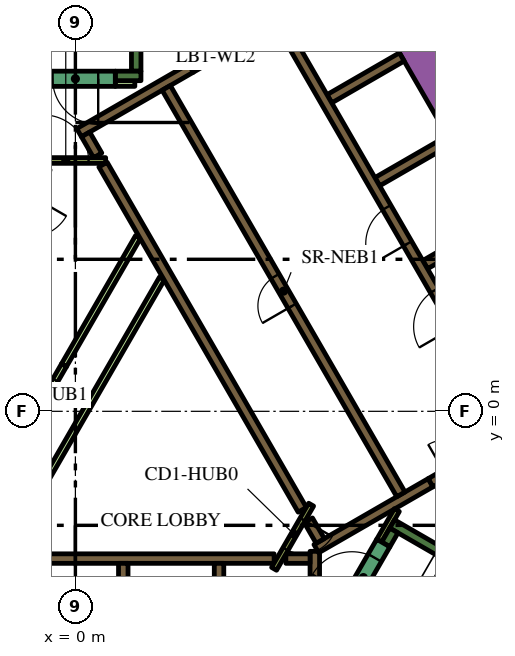
"""IFC4 building model, lengths in metres.
Left out: names, types, materials, properties, quantities, classifications, styles, units other than length and angle.
Written with IfcOpenShell. Run it as: python <this file> out.ifc"""

import sys

from ifc_helpers import new_model, si_unit, direction, frame, frame_2d, origin, place, context, subcontext, project, spatial, rectangle, extrude, element, fill, save


model = new_model("IFC4")
c1 = context("Model", 3, precision=1e-05, world=origin(), true_north=direction((0.0, 1.0)))
c2 = subcontext(c1, "Body", "Model", "MODEL_VIEW")
j1 = project(units=[si_unit("LENGTHUNIT", "METRE"), si_unit("PLANEANGLEUNIT", "RADIAN")], contexts=[c1])
p1 = place(None, origin())
s1 = spatial("IfcSite", under=j1, at=p1, CompositionType="ELEMENT")
p2 = place(p1, origin())
s2 = spatial("IfcBuilding", under=s1, at=p2, CompositionType="ELEMENT")
p3 = place(p2, frame((0.0, 0.0, 74.4)))
s3 = spatial("IfcBuildingStorey", under=s2, at=p3, CompositionType="ELEMENT", Elevation=74.4)
p4 = place(p3, frame((6.461, 13.909, 0.0), z_axis=(0.0, 0.0, 1.0), x_axis=(0.500005804227, -0.866022052686, 0.0)))
e1 = element("IfcWall", 1, at=p4, inside=s3, PredefinedType="SOLIDWALL", context=c2, shape_type="SweptSolid", body=[
    extrude(rectangle(XDim=20.834, YDim=0.9, at=frame_2d((10.417, 0.0))), origin(), (0.0, 0.0, 1.0), 3.9),
])
p5 = place(p3, frame((8.334, -2.964, 0.0), z_axis=(0.0, 0.0, 1.0), x_axis=(0.866016039709, -0.500016218704, 0.0)))
e2 = element("IfcWall", 2, at=p5, inside=s3, PredefinedType="SOLIDWALL", context=c2, shape_type="SweptSolid", body=[
    extrude(rectangle(XDim=7.05, YDim=0.25, at=frame_2d((3.525, 0.0))), origin(), (0.0, 0.0, 1.0), 3.9),
])
p6 = place(p3, frame((8.168, -3.503, 0.0), z_axis=(0.0, 0.0, 1.0), x_axis=(0.49972245349, 0.866185586049, 0.0)))
e3 = element("IfcWall", 3, at=p6, inside=s3, PredefinedType="SOLIDWALL", context=c2, shape_type="SweptSolid", body=[
    extrude(rectangle(XDim=0.425, YDim=0.25, at=frame_2d((0.212, 0.0))), origin(), (0.0, 0.0, 1.0), 3.9),
])
p7 = place(p3, frame((1.6, 8.95, 0.0), z_axis=(0.0, 0.0, 1.0), x_axis=(0.0, 1.0, 0.0)))
e4 = element("IfcWall", 4, at=p7, inside=s3, PredefinedType="SOLIDWALL", context=c2, shape_type="SweptSolid", body=[
    extrude(rectangle(XDim=6.8, YDim=0.25, at=frame_2d((3.4, 0.0))), origin(), (0.0, 0.0, 1.0), 3.9),
])
p8 = place(p3, frame((1.05, 8.825, 0.0), z_axis=(0.0, 0.0, 1.0), x_axis=(1.0, 0.0, 0.0)))
e5 = element("IfcWall", 5, at=p8, inside=s3, PredefinedType="SOLIDWALL", context=c2, shape_type="SweptSolid", body=[
    extrude(rectangle(XDim=0.675, YDim=0.25, at=frame_2d((0.337, 0.0))), origin(), (0.0, 0.0, 1.0), 3.9),
])
p9 = place(p3, frame((-5.259, -3.875, 0.0), z_axis=(0.0, 0.0, 1.0), x_axis=(1.0, 0.0, 0.0)))
e6 = element("IfcWall", 6, at=p9, inside=s3, PredefinedType="SOLIDWALL", context=c2, shape_type="SweptSolid", body=[
    extrude(rectangle(XDim=10.489, YDim=0.25, at=frame_2d((5.244, 0.0))), origin(), (0.0, 0.0, 1.0), 3.9),
])
for number, where, z_axis, x_axis in (
    (7, (3.78, -4.0, 0.0), (0.0, 0.0, 1.0), (0.0, -1.0, 0.0)),
    (8, (1.26, -4.0, 0.0), (0.0, 0.0, 1.0), (0.0, -1.0, 0.0)),
):
    element("IfcWall", number, at=place(p3, frame(where, z_axis=z_axis, x_axis=x_axis)), inside=s3, PredefinedType="SOLIDWALL", context=c2, shape_type="SweptSolid", body=[
        extrude(rectangle(XDim=2.2, YDim=0.25, at=frame_2d((1.1, 0.0))), origin(), (0.0, 0.0, 1.0), 3.9),
    ])
p10 = place(p3, frame((6.3, -7.27, 0.0), z_axis=(0.0, 0.0, 1.0), x_axis=(0.0, 1.0, 0.0)))
e9 = element("IfcWall", 9, at=p10, inside=s3, PredefinedType="SOLIDWALL", context=c2, shape_type="SweptSolid", body=[
    extrude(rectangle(XDim=3.586, YDim=0.25, at=frame_2d((1.793, 0.0))), origin(), (0.0, 0.0, 1.0), 3.9),
])
p11 = place(p3, frame((5.538, -3.875, 0.0), z_axis=(0.0, 0.0, 1.0), x_axis=(1.0, 0.0, 0.0)))
e10 = element("IfcWall", 10, at=p11, inside=s3, PredefinedType="SOLIDWALL", context=c2, shape_type="SweptSolid", body=[
    extrude(rectangle(XDim=0.637, YDim=0.25, at=frame_2d((0.318, 0.0))), origin(), (0.0, 0.0, 1.0), 3.9),
])
p12 = place(p3, frame((9.346, -1.879, 0.0), z_axis=(0.0, 0.0, 1.0), x_axis=(-0.866048528039, -0.499959945477, 0.0)))
e11 = element("IfcWall", 11, at=p12, inside=s3, PredefinedType="SOLIDWALL", context=c2, shape_type="SweptSolid", body=[
    extrude(rectangle(XDim=3.47, YDim=0.25, at=frame_2d((1.735, 0.0))), origin(), (0.0, 0.0, 1.0), 3.9),
])
p13 = place(p3, frame((6.13, -2.867, 0.0), z_axis=(0.0, 0.0, 1.0), x_axis=(0.500160776593, -0.865932559475, 0.0)))
e12 = element("IfcWall", 12, at=p13, inside=s3, PredefinedType="SOLIDWALL", context=c2, shape_type="SweptSolid", body=[
    extrude(rectangle(XDim=0.627, YDim=0.25, at=frame_2d((0.313, 0.0))), origin(), (0.0, 0.0, 1.0), 3.9),
])
for number, where, z_axis, x_axis in (
    (13, (9.204, 3.859, 0.0), (0.0, 0.0, 1.0), (0.866, 0.5, 0.0)),
    (14, (7.944, 6.041, 0.0), (0.0, 0.0, 1.0), (0.866, 0.5, 0.0)),
    (15, (6.684, 8.224, 0.0), (0.0, 0.0, 1.0), (0.866, 0.5, 0.0)),
):
    element("IfcWall", number, at=place(p3, frame(where, z_axis=z_axis, x_axis=x_axis)), inside=s3, PredefinedType="SOLIDWALL", context=c2, shape_type="SweptSolid", body=[
        extrude(rectangle(XDim=2.2, YDim=0.25, at=frame_2d((1.1, 0.0))), origin(), (0.0, 0.0, 1.0), 3.9),
    ])
p14 = place(p3, frame((0.098, 7.331, 0.0), z_axis=(0.0, 0.0, 1.0), x_axis=(0.865988154826, 0.50006451154, 0.0)))
e16 = element("IfcWall", 16, at=p14, inside=s3, PredefinedType="SOLIDWALL", context=c2, shape_type="SweptSolid", body=[
    extrude(rectangle(XDim=3.398, YDim=0.25, at=frame_2d((1.699, 0.0))), origin(), (0.0, 0.0, 1.0), 3.9),
])
p15 = place(p3, frame((0.268, 7.285, 0.0), z_axis=(0.0, 0.0, 1.0), x_axis=(0.500098681536, -0.865968422476, 0.0)))
e17 = element("IfcWall", 17, at=p15, inside=s3, PredefinedType="SOLIDWALL", context=c2, shape_type="SweptSolid", body=[
    extrude(rectangle(XDim=0.636, YDim=0.25, at=frame_2d((0.318, 0.0))), origin(), (0.0, 0.0, 1.0), 3.9),
])
p16 = place(p3, frame((5.97, -2.591, 0.0), z_axis=(0.0, 0.0, 1.0), x_axis=(-0.499994469932, 0.866028596547, 0.0)))
e18 = element("IfcWall", 18, at=p16, inside=s3, PredefinedType="SOLIDWALL", context=c2, shape_type="SweptSolid", body=[
    extrude(rectangle(XDim=10.488, YDim=0.25, at=frame_2d((5.244, 0.0))), origin(), (0.0, 0.0, 1.0), 3.9),
])
p17 = place(p3, frame((8.459, -2.599, 0.0), z_axis=(0.0, 0.0, 1.0), x_axis=(-0.500041054325, -0.866001699761, 0.0)))
e19 = element("IfcWall", 19, at=p17, inside=s3, PredefinedType="PARTITIONING", context=c2, shape_type="SweptSolid", body=[
    extrude(rectangle(XDim=0.929, YDim=0.15, at=frame_2d((0.464, 0.0))), origin(), (0.0, 0.0, 1.0), 3.9),
])
p18 = place(p3, frame((-1.887, -3.718, 0.0), z_axis=(0.0, 0.0, 1.0), x_axis=(0.500005008002, 0.866022512394, 0.0)))
e20 = element("IfcWall", 20, at=p18, inside=s3, PredefinedType="PARTITIONING", context=c2, shape_type="SweptSolid", body=[
    extrude(rectangle(XDim=8.327, YDim=0.15, at=frame_2d((4.164, 0.0))), origin(), (0.0, 0.0, 1.0), 2.7),
])
p19 = place(p3, frame((-0.3, 1.212, 0.0), z_axis=(0.0, 0.0, 1.0), x_axis=(0.499963101113, 0.866046706318, 0.0)))
e21 = element("IfcWall", 21, at=p19, inside=s3, PredefinedType="PARTITIONING", context=c2, shape_type="SweptSolid", body=[
    extrude(rectangle(XDim=3.893, YDim=0.15, at=frame_2d((1.947, 0.0))), origin(), (0.0, 0.0, 1.0), 2.7),
])
p20 = place(p3, frame((1.05, 8.625, 0.0), z_axis=(0.0, 0.0, 1.0), x_axis=(1.0, 0.0, 0.0)))
e22 = element("IfcWall", 22, at=p20, inside=s3, PredefinedType="PARTITIONING", context=c2, shape_type="SweptSolid", body=[
    extrude(rectangle(XDim=0.514, YDim=0.15, at=frame_2d((0.257, 0.0))), origin(), (0.0, 0.0, 1.0), 2.7),
])
p21 = place(p3, frame((11.553, -0.46, 0.0), z_axis=(0.0, 0.0, 1.0), x_axis=(-0.500006514828, 0.866021642414, 0.0)))
e23 = element("IfcWall", 23, at=p21, inside=s3, PredefinedType="SOLIDWALL", context=c2, shape_type="SweptSolid", body=[
    extrude(rectangle(XDim=12.35, YDim=0.25, at=frame_2d((6.175, 0.0))), origin(), (0.0, 0.0, 1.0), 3.9),
])
p22 = place(p21, frame((0.585, 0.0, 0.0)))
e24 = element("IfcOpeningElement", 24, at=p22, cuts=e23, PredefinedType="OPENING", context=c2, shape_type="SweptSolid", body=[
    extrude(rectangle(XDim=1.1, YDim=2.1, at=frame_2d((0.55, 1.05))), frame((0.0, 0.135, 0.0), z_axis=(0.0, -1.0, 0.0), x_axis=(1.0, 0.0, 0.0)), (0.0, 0.0, 1.0), 0.27),
])
p23 = place(p21, frame((3.105, 0.0, 0.0)))
e25 = element("IfcOpeningElement", 25, at=p23, cuts=e23, PredefinedType="OPENING", context=c2, shape_type="SweptSolid", body=[
    extrude(rectangle(XDim=1.1, YDim=2.1, at=frame_2d((0.55, 1.05))), frame((0.0, 0.135, 0.0), z_axis=(0.0, -1.0, 0.0), x_axis=(1.0, 0.0, 0.0)), (0.0, 0.0, 1.0), 0.27),
])
p24 = place(p21, frame((5.625, 0.0, 0.0)))
e26 = element("IfcOpeningElement", 26, at=p24, cuts=e23, PredefinedType="OPENING", context=c2, shape_type="SweptSolid", body=[
    extrude(rectangle(XDim=1.1, YDim=2.1, at=frame_2d((0.55, 1.05))), frame((0.0, 0.135, 0.0), z_axis=(0.0, -1.0, 0.0), x_axis=(1.0, 0.0, 0.0)), (0.0, 0.0, 1.0), 0.27),
])
p25 = place(p3, frame((8.565, -2.185, 0.0), z_axis=(0.0, 0.0, 1.0), x_axis=(-0.499997954832, 0.866026584559, 0.0)))
e27 = element("IfcWall", 27, at=p25, inside=s3, PredefinedType="SOLIDWALL", context=c2, shape_type="SweptSolid", body=[
    extrude(rectangle(XDim=12.35, YDim=0.25, at=frame_2d((6.175, 0.0))), origin(), (0.0, 0.0, 1.0), 3.9),
])
p26 = place(p25, frame((5.725, 0.0, 0.0)))
e28 = element("IfcOpeningElement", 28, at=p26, cuts=e27, PredefinedType="OPENING", context=c2, shape_type="SweptSolid", body=[
    extrude(rectangle(XDim=0.9, YDim=2.1, at=frame_2d((0.45, 1.05))), frame((0.0, 0.135, 0.0), z_axis=(0.0, -1.0, 0.0), x_axis=(1.0, 0.0, 0.0)), (0.0, 0.0, 1.0), 0.27),
])
p27 = place(p3, frame((7.053, -5.284, 0.0), z_axis=(0.0, 0.0, 1.0), x_axis=(0.500078061341, 0.865980330357, 0.0)))
e29 = element("IfcWall", 29, at=p27, inside=s3, PredefinedType="SOLIDWALL", context=c2, shape_type="SweptSolid", body=[
    extrude(rectangle(XDim=2.1, YDim=0.4, at=frame_2d((1.05, 0.0))), origin(), (0.0, 0.0, 1.0), 3.9),
])
p28 = place(p27, frame((0.45, 0.0, 0.0)))
e30 = element("IfcOpeningElement", 30, at=p28, cuts=e29, PredefinedType="OPENING", context=c2, shape_type="SweptSolid", body=[
    extrude(rectangle(XDim=1.2, YDim=2.1, at=frame_2d((0.6, 1.05))), frame((0.0, 0.21, 0.0), z_axis=(0.0, -1.0, 0.0), x_axis=(1.0, 0.0, 0.0)), (0.0, 0.0, 1.0), 0.42),
])
p29 = place(p3, frame((9.346, -1.879, 0.0), z_axis=(0.0, 0.0, 1.0), x_axis=(0.866047807691, 0.499961193289, 0.0)))
e31 = element("IfcWall", 31, at=p29, inside=s3, PredefinedType="SOLIDWALL", context=c2, shape_type="SweptSolid", body=[
    extrude(rectangle(XDim=1.8, YDim=0.25, at=frame_2d((0.9, 0.0))), origin(), (0.0, 0.0, 1.0), 3.9),
])
p30 = place(p29, frame((0.45, 0.0, 0.0)))
e32 = element("IfcOpeningElement", 32, at=p30, cuts=e31, PredefinedType="OPENING", context=c2, shape_type="SweptSolid", body=[
    extrude(rectangle(XDim=0.9, YDim=2.1, at=frame_2d((0.45, 1.05))), frame((0.0, 0.135, 0.0), z_axis=(0.0, -1.0, 0.0), x_axis=(1.0, 0.0, 0.0)), (0.0, 0.0, 1.0), 0.27),
])
p31 = place(p3, frame((1.05, 8.75, 0.0), z_axis=(0.0, 0.0, 1.0), x_axis=(-1.0, 0.0, 0.0)))
e33 = element("IfcWall", 33, at=p31, inside=s3, PredefinedType="SOLIDWALL", context=c2, shape_type="SweptSolid", body=[
    extrude(rectangle(XDim=2.1, YDim=0.4, at=frame_2d((1.05, 0.0))), origin(), (0.0, 0.0, 1.0), 3.9),
])
p32 = place(p31, frame((0.45, 0.0, 0.0)))
e34 = element("IfcOpeningElement", 34, at=p32, cuts=e33, PredefinedType="OPENING", context=c2, shape_type="SweptSolid", body=[
    extrude(rectangle(XDim=1.2, YDim=2.1, at=frame_2d((0.6, 1.05))), frame((0.0, 0.21, 0.0), z_axis=(0.0, -1.0, 0.0), x_axis=(1.0, 0.0, 0.0)), (0.0, 0.0, 1.0), 0.42),
])
p33 = place(p3, frame((6.203, -2.456, 0.0), z_axis=(0.0, 0.0, 1.0), x_axis=(-0.500043961785, -0.866000020948, 0.0)))
e35 = element("IfcWall", 35, at=p33, inside=s3, PredefinedType="PARTITIONING", context=c2, shape_type="SweptSolid", body=[
    extrude(rectangle(XDim=1.95, YDim=0.15, at=frame_2d((0.975, 0.0))), origin(), (0.0, 0.0, 1.0), 3.9),
])
p34 = place(p33, frame((0.45, 0.0, 0.0)))
e36 = element("IfcOpeningElement", 36, at=p34, cuts=e35, PredefinedType="OPENING", context=c2, shape_type="SweptSolid", body=[
    extrude(rectangle(XDim=0.9, YDim=2.1, at=frame_2d((0.45, 1.05))), frame((0.0, 0.085, 0.0), z_axis=(0.0, -1.0, 0.0), x_axis=(1.0, 0.0, 0.0)), (0.0, 0.0, 1.0), 0.17),
])
p35 = place(p3, frame((-1.303, 6.6, 0.0), z_axis=(0.0, 0.0, 1.0), x_axis=(1.0, 0.0, 0.0)))
e37 = element("IfcWall", 37, at=p35, inside=s3, PredefinedType="PARTITIONING", context=c2, shape_type="SweptSolid", body=[
    extrude(rectangle(XDim=2.1, YDim=0.15, at=frame_2d((1.05, 0.0))), origin(), (0.0, 0.0, 1.0), 3.9),
])
p36 = place(p35, frame((0.45, 0.0, 0.0)))
e38 = element("IfcOpeningElement", 38, at=p36, cuts=e37, PredefinedType="OPENING", context=c2, shape_type="SweptSolid", body=[
    extrude(rectangle(XDim=1.2, YDim=2.1, at=frame_2d((0.6, 1.05))), frame((0.0, 0.085, 0.0), z_axis=(0.0, -1.0, 0.0), x_axis=(1.0, 0.0, 0.0)), (0.0, 0.0, 1.0), 0.17),
])
p37 = place(p3, frame((3.081, 8.961, 0.0), z_axis=(0.0, 0.0, 1.0), x_axis=(0.866034573852, 0.49998411664, 0.0)))
e39 = element("IfcWall", 39, at=p37, inside=s3, PredefinedType="PARTITIONING", context=c2, shape_type="SweptSolid", body=[
    extrude(rectangle(XDim=1.4, YDim=0.09, at=frame_2d((0.7, 0.0))), origin(), (0.0, 0.0, 1.0), 2.7),
])
p38 = place(p37, frame((0.1, 0.0, 0.0)))
e40 = element("IfcOpeningElement", 40, at=p38, cuts=e39, PredefinedType="OPENING", context=c2, shape_type="SweptSolid", body=[
    extrude(rectangle(XDim=1.2, YDim=2.1, at=frame_2d((0.6, 1.05))), frame((0.0, 0.055, 0.0), z_axis=(0.0, -1.0, 0.0), x_axis=(1.0, 0.0, 0.0)), (0.0, 0.0, 1.0), 0.11),
])
p39 = place(p3, frame((-1.2, -0.346, 0.0), z_axis=(0.0, 0.0, 1.0), x_axis=(0.499961193289, 0.866047807691, 0.0)))
e41 = element("IfcWall", 41, at=p39, inside=s3, PredefinedType="PARTITIONING", context=c2, shape_type="SweptSolid", body=[
    extrude(rectangle(XDim=1.8, YDim=0.15, at=frame_2d((0.9, 0.0))), origin(), (0.0, 0.0, 1.0), 2.7),
])
p40 = place(p39, frame((0.45, 0.0, 0.0)))
e42 = element("IfcOpeningElement", 42, at=p40, cuts=e41, PredefinedType="OPENING", context=c2, shape_type="SweptSolid", body=[
    extrude(rectangle(XDim=0.9, YDim=2.1, at=frame_2d((0.45, 1.05))), frame((0.0, 0.085, 0.0), z_axis=(0.0, -1.0, 0.0), x_axis=(1.0, 0.0, 0.0)), (0.0, 0.0, 1.0), 0.17),
])
p41 = place(p3, frame((6.163, 18.475, 0.0), z_axis=(0.0, 0.0, 1.0), x_axis=(0.500001317485, -0.866024643133, 0.0)))
e43 = element("IfcWall", 43, at=p41, inside=s3, PredefinedType="PARTITIONING", context=c2, shape_type="SweptSolid", body=[
    extrude(rectangle(XDim=25.767, YDim=0.15, at=frame_2d((12.883, 0.0))), origin(), (0.0, 0.0, 1.0), 2.7),
])
p42 = place(p41, frame((21.953, 0.0, 0.0)))
e44 = element("IfcOpeningElement", 44, at=p42, cuts=e43, PredefinedType="OPENING", context=c2, shape_type="SweptSolid", body=[
    extrude(rectangle(XDim=1.0, YDim=2.1, at=frame_2d((0.5, 1.05))), frame((0.0, 0.085, 0.0), z_axis=(0.0, -1.0, 0.0), x_axis=(1.0, 0.0, 0.0)), (0.0, 0.0, 1.0), 0.17),
])
p43 = place(p41, frame((9.948, 0.0, 0.0)))
e45 = element("IfcOpeningElement", 45, at=p43, cuts=e43, PredefinedType="OPENING", context=c2, shape_type="SweptSolid", body=[
    extrude(rectangle(XDim=1.0, YDim=2.1, at=frame_2d((0.5, 1.05))), frame((0.0, 0.085, 0.0), z_axis=(0.0, -1.0, 0.0), x_axis=(1.0, 0.0, 0.0)), (0.0, 0.0, 1.0), 0.17),
])
p44 = place(p41, frame((8.641, 0.0, 0.0)))
e46 = element("IfcOpeningElement", 46, at=p44, cuts=e43, PredefinedType="OPENING", context=c2, shape_type="SweptSolid", body=[
    extrude(rectangle(XDim=1.0, YDim=2.1, at=frame_2d((0.5, 1.05))), frame((0.0, 0.085, 0.0), z_axis=(0.0, -1.0, 0.0), x_axis=(1.0, 0.0, 0.0)), (0.0, 0.0, 1.0), 0.17),
])
p45 = place(p23, origin())
e47 = element("IfcDoor", 47, at=p45, inside=s3, OperationType="DOUBLE_DOOR_SLIDING", PredefinedType="DOOR", context=c2, shape_type="SweptSolid", body=[
    extrude(rectangle(XDim=1.1, YDim=2.1, at=frame_2d((0.55, 1.05))), frame((0.0, 0.025, 0.0), z_axis=(0.0, -1.0, 0.0), x_axis=(1.0, 0.0, 0.0)), (0.0, 0.0, 1.0), 0.05),
])
fill(e25, e47)
p46 = place(p24, origin())
e48 = element("IfcDoor", 48, at=p46, inside=s3, OperationType="DOUBLE_DOOR_SLIDING", PredefinedType="DOOR", context=c2, shape_type="SweptSolid", body=[
    extrude(rectangle(XDim=1.1, YDim=2.1, at=frame_2d((0.55, 1.05))), frame((0.0, 0.025, 0.0), z_axis=(0.0, -1.0, 0.0), x_axis=(1.0, 0.0, 0.0)), (0.0, 0.0, 1.0), 0.05),
])
fill(e26, e48)
p47 = place(p26, origin())
e49 = element("IfcDoor", 49, at=p47, inside=s3, OperationType="SINGLE_SWING_LEFT", PredefinedType="DOOR", context=c2, shape_type="SweptSolid", body=[
    extrude(rectangle(XDim=0.9, YDim=2.1, at=frame_2d((0.45, 1.05))), frame((0.0, 0.025, 0.0), z_axis=(0.0, -1.0, 0.0), x_axis=(1.0, 0.0, 0.0)), (0.0, 0.0, 1.0), 0.05),
])
fill(e28, e49)
p48 = place(p28, origin())
e50 = element("IfcDoor", 50, at=p48, inside=s3, OperationType="SINGLE_SWING_LEFT", PredefinedType="DOOR", context=c2, shape_type="SweptSolid", body=[
    extrude(rectangle(XDim=1.2, YDim=2.1, at=frame_2d((0.6, 1.05))), frame((0.0, 0.025, 0.0), z_axis=(0.0, -1.0, 0.0), x_axis=(1.0, 0.0, 0.0)), (0.0, 0.0, 1.0), 0.05),
])
fill(e30, e50)
p49 = place(p32, origin())
e51 = element("IfcDoor", 51, at=p49, inside=s3, OperationType="SINGLE_SWING_LEFT", PredefinedType="DOOR", context=c2, shape_type="SweptSolid", body=[
    extrude(rectangle(XDim=1.2, YDim=2.1, at=frame_2d((0.6, 1.05))), frame((0.0, 0.025, 0.0), z_axis=(0.0, -1.0, 0.0), x_axis=(1.0, 0.0, 0.0)), (0.0, 0.0, 1.0), 0.05),
])
fill(e34, e51)
p50 = place(p34, origin())
e52 = element("IfcDoor", 52, at=p50, inside=s3, OperationType="SINGLE_SWING_LEFT", PredefinedType="DOOR", context=c2, shape_type="SweptSolid", body=[
    extrude(rectangle(XDim=0.9, YDim=2.1, at=frame_2d((0.45, 1.05))), frame((0.0, 0.025, 0.0), z_axis=(0.0, -1.0, 0.0), x_axis=(1.0, 0.0, 0.0)), (0.0, 0.0, 1.0), 0.05),
])
fill(e36, e52)
p51 = place(p36, origin())
e53 = element("IfcDoor", 53, at=p51, inside=s3, OperationType="SINGLE_SWING_LEFT", PredefinedType="DOOR", context=c2, shape_type="SweptSolid", body=[
    extrude(rectangle(XDim=1.2, YDim=2.1, at=frame_2d((0.6, 1.05))), frame((0.0, 0.025, 0.0), z_axis=(0.0, -1.0, 0.0), x_axis=(1.0, 0.0, 0.0)), (0.0, 0.0, 1.0), 0.05),
])
fill(e38, e53)
p52 = place(p38, origin())
e54 = element("IfcDoor", 54, at=p52, inside=s3, OperationType="SINGLE_SWING_LEFT", PredefinedType="DOOR", context=c2, shape_type="SweptSolid", body=[
    extrude(rectangle(XDim=1.2, YDim=2.1, at=frame_2d((0.6, 1.05))), frame((0.0, 0.025, 0.0), z_axis=(0.0, -1.0, 0.0), x_axis=(1.0, 0.0, 0.0)), (0.0, 0.0, 1.0), 0.05),
])
fill(e40, e54)
p53 = place(p40, origin())
e55 = element("IfcDoor", 55, at=p53, inside=s3, OperationType="SINGLE_SWING_LEFT", PredefinedType="DOOR", context=c2, shape_type="SweptSolid", body=[
    extrude(rectangle(XDim=0.9, YDim=2.1, at=frame_2d((0.45, 1.05))), frame((0.0, 0.025, 0.0), z_axis=(0.0, -1.0, 0.0), x_axis=(1.0, 0.0, 0.0)), (0.0, 0.0, 1.0), 0.05),
])
fill(e42, e55)
save(model, sys.argv[1])
